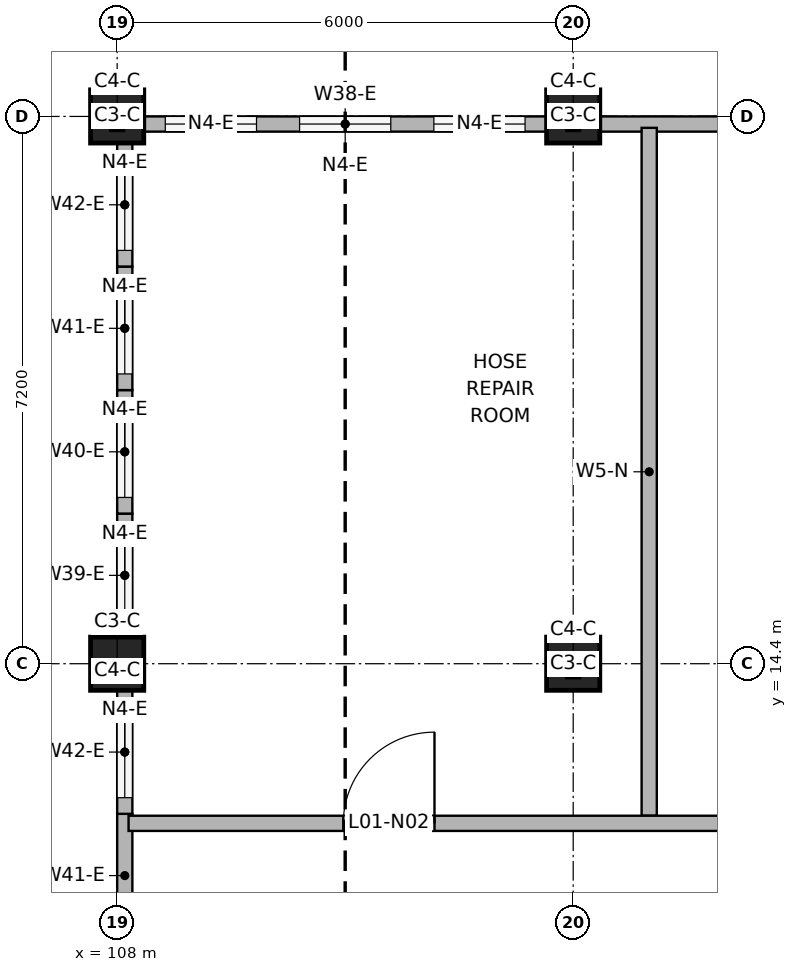
"""IFC4 building model, lengths in metres.
Left out: names, types, materials, properties, quantities, classifications, styles, units other than length and angle.
Written with IfcOpenShell. Run it as: python <this file> out.ifc"""

import sys

from ifc_helpers import new_model, si_unit, direction, frame, frame_2d, origin, origin_2d, place, context, subcontext, project, spatial, rectangle, hollow_rectangle, extrude, element, fill, save


model = new_model("IFC4")
c1 = context("Model", 3, precision=1e-05, world=origin(), true_north=direction((0.0, 1.0)))
c2 = subcontext(c1, "Body", "Model", "MODEL_VIEW")
j1 = project(units=[si_unit("LENGTHUNIT", "METRE"), si_unit("PLANEANGLEUNIT", "RADIAN")], contexts=[c1])
p1 = place(None, origin())
s1 = spatial("IfcSite", under=j1, at=p1, CompositionType="ELEMENT")
p2 = place(p1, origin())
s2 = spatial("IfcBuilding", under=s1, at=p2, CompositionType="ELEMENT")
p3 = place(p2, frame((0.0, 0.0, 4.2)))
s3 = spatial("IfcBuildingStorey", under=s2, at=p3, CompositionType="ELEMENT", Elevation=4.2)
for number, where, z_axis, x_axis in (
    (1, (108.0, 14.4, 0.0), (0.0, 0.0, 1.0), (1.0, 0.0, 0.0)),
    (2, (114.0, 14.4, 0.0), (0.0, 0.0, 1.0), (1.0, 0.0, 0.0)),
    (3, (108.0, 21.6, 0.0), (0.0, 0.0, 1.0), (1.0, 0.0, 0.0)),
    (4, (114.0, 21.6, 0.0), (0.0, 0.0, 1.0), (1.0, 0.0, 0.0)),
):
    element("IfcColumn", number, at=place(p3, frame(where, z_axis=z_axis, x_axis=x_axis)), inside=s3, PredefinedType="COLUMN", context=c2, shape_type="SweptSolid", body=[
        extrude(rectangle(XDim=0.7, YDim=0.7, at=origin_2d()), origin(), (0.0, 0.0, 1.0), 4.004),
    ])
for number, where, z_axis, x_axis in (
    (5, (108.0, 14.3, 4.004), (0.0, 0.0, 1.0), (1.0, 0.0, 0.0)),
    (6, (114.0, 14.3, 4.004), (0.0, 0.0, 1.0), (1.0, 0.0, 0.0)),
    (7, (108.0, 21.5, 4.004), (0.0, 0.0, 1.0), (1.0, 0.0, 0.0)),
    (8, (114.0, 21.5, 4.004), (0.0, 0.0, 1.0), (1.0, 0.0, 0.0)),
):
    element("IfcColumn", number, at=place(p3, frame(where, z_axis=z_axis, x_axis=x_axis)), inside=s3, PredefinedType="COLUMN", context=c2, shape_type="SweptSolid", body=[
        extrude(hollow_rectangle(XDim=0.15, YDim=0.15, WallThickness=0.008, at=origin_2d()), origin(), (0.0, 0.0, 1.0), 1.155),
    ])
p4 = place(p3, frame((108.35, 21.5, 0.0), z_axis=(0.0, 0.0, 1.0), x_axis=(1.0, 0.0, 0.0)))
e9 = element("IfcWall", 9, at=p4, inside=s3, PredefinedType="SOLIDWALL", context=c2, shape_type="SweptSolid", body=[
    extrude(rectangle(XDim=5.3, YDim=0.2, at=frame_2d((2.65, 0.0))), origin(), (0.0, 0.0, 1.0), 3.204),
])
p5 = place(p4, frame((0.283, 0.0, 1.2)))
e10 = element("IfcOpeningElement", 10, at=p5, cuts=e9, PredefinedType="OPENING", context=c2, shape_type="SweptSolid", body=[
    extrude(rectangle(XDim=1.2, YDim=1.4, at=frame_2d((0.6, 0.7))), frame((0.0, 0.11, 0.0), z_axis=(0.0, -1.0, 0.0), x_axis=(1.0, 0.0, 0.0)), (0.0, 0.0, 1.0), 0.22),
])
p6 = place(p4, frame((2.05, 0.0, 1.2)))
e11 = element("IfcOpeningElement", 11, at=p6, cuts=e9, PredefinedType="OPENING", context=c2, shape_type="SweptSolid", body=[
    extrude(rectangle(XDim=1.2, YDim=1.4, at=frame_2d((0.6, 0.7))), frame((0.0, 0.11, 0.0), z_axis=(0.0, -1.0, 0.0), x_axis=(1.0, 0.0, 0.0)), (0.0, 0.0, 1.0), 0.22),
])
p7 = place(p4, frame((3.817, 0.0, 1.2)))
e12 = element("IfcOpeningElement", 12, at=p7, cuts=e9, PredefinedType="OPENING", context=c2, shape_type="SweptSolid", body=[
    extrude(rectangle(XDim=1.2, YDim=1.4, at=frame_2d((0.6, 0.7))), frame((0.0, 0.11, 0.0), z_axis=(0.0, -1.0, 0.0), x_axis=(1.0, 0.0, 0.0)), (0.0, 0.0, 1.0), 0.22),
])
p8 = place(p3, frame((114.35, 21.5, 0.0), z_axis=(0.0, 0.0, 1.0), x_axis=(1.0, 0.0, 0.0)))
e13 = element("IfcWall", 13, at=p8, inside=s3, PredefinedType="SOLIDWALL", context=c2, shape_type="SweptSolid", body=[
    extrude(rectangle(XDim=5.3, YDim=0.2, at=frame_2d((2.65, 0.0))), origin(), (0.0, 0.0, 1.0), 3.204),
])
p9 = place(p3, frame((108.1, 10.8, 0.0), z_axis=(0.0, 0.0, 1.0), x_axis=(0.0, 1.0, 0.0)))
e14 = element("IfcWall", 14, at=p9, inside=s3, PredefinedType="SOLIDWALL", context=c2, shape_type="SweptSolid", body=[
    extrude(rectangle(XDim=1.625, YDim=0.2, at=frame_2d((0.812, 0.0))), origin(), (0.0, 0.0, 1.0), 4.691),
])
p10 = place(p3, frame((108.1, 12.425, 0.0), z_axis=(0.0, 0.0, 1.0), x_axis=(0.0, 1.0, 0.0)))
e15 = element("IfcWall", 15, at=p10, inside=s3, PredefinedType="SOLIDWALL", context=c2, shape_type="SweptSolid", body=[
    extrude(rectangle(XDim=1.625, YDim=0.2, at=frame_2d((0.812, 0.0))), origin(), (0.0, 0.0, 1.0), 5.007),
])
p11 = place(p10, frame((0.212, 0.0, 1.2)))
e16 = element("IfcOpeningElement", 16, at=p11, cuts=e15, PredefinedType="OPENING", context=c2, shape_type="SweptSolid", body=[
    extrude(rectangle(XDim=1.2, YDim=1.4, at=frame_2d((0.6, 0.7))), frame((0.0, 0.11, 0.0), z_axis=(0.0, -1.0, 0.0), x_axis=(1.0, 0.0, 0.0)), (0.0, 0.0, 1.0), 0.22),
])
p12 = place(p3, frame((108.1, 14.75, 0.0), z_axis=(0.0, 0.0, 1.0), x_axis=(0.0, 1.0, 0.0)))
e17 = element("IfcWall", 17, at=p12, inside=s3, PredefinedType="SOLIDWALL", context=c2, shape_type="SweptSolid", body=[
    extrude(rectangle(XDim=1.625, YDim=0.2, at=frame_2d((0.812, 0.0))), origin(), (0.0, 0.0, 1.0), 4.059),
])
p13 = place(p12, frame((0.212, 0.0, 1.2)))
e18 = element("IfcOpeningElement", 18, at=p13, cuts=e17, PredefinedType="OPENING", context=c2, shape_type="SweptSolid", body=[
    extrude(rectangle(XDim=1.2, YDim=1.4, at=frame_2d((0.6, 0.7))), frame((0.0, 0.11, 0.0), z_axis=(0.0, -1.0, 0.0), x_axis=(1.0, 0.0, 0.0)), (0.0, 0.0, 1.0), 0.22),
])
p14 = place(p3, frame((108.1, 16.375, 0.0), z_axis=(0.0, 0.0, 1.0), x_axis=(0.0, 1.0, 0.0)))
e19 = element("IfcWall", 19, at=p14, inside=s3, PredefinedType="SOLIDWALL", context=c2, shape_type="SweptSolid", body=[
    extrude(rectangle(XDim=1.625, YDim=0.2, at=frame_2d((0.812, 0.0))), origin(), (0.0, 0.0, 1.0), 4.375),
])
p15 = place(p14, frame((0.212, 0.0, 1.2)))
e20 = element("IfcOpeningElement", 20, at=p15, cuts=e19, PredefinedType="OPENING", context=c2, shape_type="SweptSolid", body=[
    extrude(rectangle(XDim=1.2, YDim=1.4, at=frame_2d((0.6, 0.7))), frame((0.0, 0.11, 0.0), z_axis=(0.0, -1.0, 0.0), x_axis=(1.0, 0.0, 0.0)), (0.0, 0.0, 1.0), 0.22),
])
p16 = place(p3, frame((108.1, 18.0, 0.0), z_axis=(0.0, 0.0, 1.0), x_axis=(0.0, 1.0, 0.0)))
e21 = element("IfcWall", 21, at=p16, inside=s3, PredefinedType="SOLIDWALL", context=c2, shape_type="SweptSolid", body=[
    extrude(rectangle(XDim=1.625, YDim=0.2, at=frame_2d((0.812, 0.0))), origin(), (0.0, 0.0, 1.0), 4.691),
])
p17 = place(p16, frame((0.212, 0.0, 1.2)))
e22 = element("IfcOpeningElement", 22, at=p17, cuts=e21, PredefinedType="OPENING", context=c2, shape_type="SweptSolid", body=[
    extrude(rectangle(XDim=1.2, YDim=1.4, at=frame_2d((0.6, 0.7))), frame((0.0, 0.11, 0.0), z_axis=(0.0, -1.0, 0.0), x_axis=(1.0, 0.0, 0.0)), (0.0, 0.0, 1.0), 0.22),
])
p18 = place(p3, frame((108.1, 19.625, 0.0), z_axis=(0.0, 0.0, 1.0), x_axis=(0.0, 1.0, 0.0)))
e23 = element("IfcWall", 23, at=p18, inside=s3, PredefinedType="SOLIDWALL", context=c2, shape_type="SweptSolid", body=[
    extrude(rectangle(XDim=1.625, YDim=0.2, at=frame_2d((0.812, 0.0))), origin(), (0.0, 0.0, 1.0), 5.007),
])
p19 = place(p18, frame((0.212, 0.0, 1.2)))
e24 = element("IfcOpeningElement", 24, at=p19, cuts=e23, PredefinedType="OPENING", context=c2, shape_type="SweptSolid", body=[
    extrude(rectangle(XDim=1.2, YDim=1.4, at=frame_2d((0.6, 0.7))), frame((0.0, 0.11, 0.0), z_axis=(0.0, -1.0, 0.0), x_axis=(1.0, 0.0, 0.0)), (0.0, 0.0, 1.0), 0.22),
])
p20 = place(p3, frame((115.0, 12.4, 0.0), z_axis=(0.0, 0.0, 1.0), x_axis=(0.0, 1.0, 0.0)))
e25 = element("IfcWall", 25, at=p20, inside=s3, PredefinedType="PARTITIONING", context=c2, shape_type="SweptSolid", body=[
    extrude(rectangle(XDim=9.05, YDim=0.2, at=frame_2d((4.525, 0.0))), origin(), (0.0, 0.0, 1.0), 3.204),
])
p21 = place(p3, frame((108.15, 12.3, 0.0), z_axis=(0.0, 0.0, 1.0), x_axis=(1.0, 0.0, 0.0)))
e26 = element("IfcWall", 26, at=p21, inside=s3, PredefinedType="PARTITIONING", context=c2, shape_type="SweptSolid", body=[
    extrude(rectangle(XDim=17.7, YDim=0.2, at=frame_2d((8.85, 0.0))), origin(), (0.0, 0.0, 1.0), 3.95),
])
p22 = place(p21, frame((2.825, 0.0, 0.0)))
e27 = element("IfcOpeningElement", 27, at=p22, cuts=e26, PredefinedType="OPENING", context=c2, shape_type="SweptSolid", body=[
    extrude(rectangle(XDim=1.2, YDim=2.1, at=frame_2d((0.6, 1.05))), frame((0.0, 0.11, 0.0), z_axis=(0.0, -1.0, 0.0), x_axis=(1.0, 0.0, 0.0)), (0.0, 0.0, 1.0), 0.22),
])
p23 = place(p21, frame((9.75, 0.0, 0.0)))
e28 = element("IfcOpeningElement", 28, at=p23, cuts=e26, PredefinedType="OPENING", context=c2, shape_type="SweptSolid", body=[
    extrude(rectangle(XDim=1.2, YDim=2.1, at=frame_2d((0.6, 1.05))), frame((0.0, 0.11, 0.0), z_axis=(0.0, -1.0, 0.0), x_axis=(1.0, 0.0, 0.0)), (0.0, 0.0, 1.0), 0.22),
])
p24 = place(p21, frame((15.275, 0.0, 0.0)))
e29 = element("IfcOpeningElement", 29, at=p24, cuts=e26, PredefinedType="OPENING", context=c2, shape_type="SweptSolid", body=[
    extrude(rectangle(XDim=1.0, YDim=2.1, at=frame_2d((0.5, 1.05))), frame((0.0, 0.11, 0.0), z_axis=(0.0, -1.0, 0.0), x_axis=(1.0, 0.0, 0.0)), (0.0, 0.0, 1.0), 0.22),
])
p25 = place(p5, origin())
e30 = element("IfcWindow", 30, at=p25, inside=s3, PartitioningType="SINGLE_PANEL", PredefinedType="WINDOW", context=c2, shape_type="SweptSolid", body=[
    extrude(rectangle(XDim=1.2, YDim=1.4, at=frame_2d((0.6, 0.7))), frame((0.0, 0.03, 0.0), z_axis=(0.0, -1.0, 0.0), x_axis=(1.0, 0.0, 0.0)), (0.0, 0.0, 1.0), 0.06),
])
fill(e10, e30)
p26 = place(p6, origin())
e31 = element("IfcWindow", 31, at=p26, inside=s3, PartitioningType="SINGLE_PANEL", PredefinedType="WINDOW", context=c2, shape_type="SweptSolid", body=[
    extrude(rectangle(XDim=1.2, YDim=1.4, at=frame_2d((0.6, 0.7))), frame((0.0, 0.03, 0.0), z_axis=(0.0, -1.0, 0.0), x_axis=(1.0, 0.0, 0.0)), (0.0, 0.0, 1.0), 0.06),
])
fill(e11, e31)
p27 = place(p7, origin())
e32 = element("IfcWindow", 32, at=p27, inside=s3, PartitioningType="SINGLE_PANEL", PredefinedType="WINDOW", context=c2, shape_type="SweptSolid", body=[
    extrude(rectangle(XDim=1.2, YDim=1.4, at=frame_2d((0.6, 0.7))), frame((0.0, 0.03, 0.0), z_axis=(0.0, -1.0, 0.0), x_axis=(1.0, 0.0, 0.0)), (0.0, 0.0, 1.0), 0.06),
])
fill(e12, e32)
p28 = place(p11, origin())
e33 = element("IfcWindow", 33, at=p28, inside=s3, PartitioningType="SINGLE_PANEL", PredefinedType="WINDOW", context=c2, shape_type="SweptSolid", body=[
    extrude(rectangle(XDim=1.2, YDim=1.4, at=frame_2d((0.6, 0.7))), frame((0.0, 0.03, 0.0), z_axis=(0.0, -1.0, 0.0), x_axis=(1.0, 0.0, 0.0)), (0.0, 0.0, 1.0), 0.06),
])
fill(e16, e33)
p29 = place(p13, origin())
e34 = element("IfcWindow", 34, at=p29, inside=s3, PartitioningType="SINGLE_PANEL", PredefinedType="WINDOW", context=c2, shape_type="SweptSolid", body=[
    extrude(rectangle(XDim=1.2, YDim=1.4, at=frame_2d((0.6, 0.7))), frame((0.0, 0.03, 0.0), z_axis=(0.0, -1.0, 0.0), x_axis=(1.0, 0.0, 0.0)), (0.0, 0.0, 1.0), 0.06),
])
fill(e18, e34)
p30 = place(p15, origin())
e35 = element("IfcWindow", 35, at=p30, inside=s3, PartitioningType="SINGLE_PANEL", PredefinedType="WINDOW", context=c2, shape_type="SweptSolid", body=[
    extrude(rectangle(XDim=1.2, YDim=1.4, at=frame_2d((0.6, 0.7))), frame((0.0, 0.03, 0.0), z_axis=(0.0, -1.0, 0.0), x_axis=(1.0, 0.0, 0.0)), (0.0, 0.0, 1.0), 0.06),
])
fill(e20, e35)
p31 = place(p17, origin())
e36 = element("IfcWindow", 36, at=p31, inside=s3, PartitioningType="SINGLE_PANEL", PredefinedType="WINDOW", context=c2, shape_type="SweptSolid", body=[
    extrude(rectangle(XDim=1.2, YDim=1.4, at=frame_2d((0.6, 0.7))), frame((0.0, 0.03, 0.0), z_axis=(0.0, -1.0, 0.0), x_axis=(1.0, 0.0, 0.0)), (0.0, 0.0, 1.0), 0.06),
])
fill(e22, e36)
p32 = place(p19, origin())
e37 = element("IfcWindow", 37, at=p32, inside=s3, PartitioningType="SINGLE_PANEL", PredefinedType="WINDOW", context=c2, shape_type="SweptSolid", body=[
    extrude(rectangle(XDim=1.2, YDim=1.4, at=frame_2d((0.6, 0.7))), frame((0.0, 0.03, 0.0), z_axis=(0.0, -1.0, 0.0), x_axis=(1.0, 0.0, 0.0)), (0.0, 0.0, 1.0), 0.06),
])
fill(e24, e37)
p33 = place(p22, origin())
e38 = element("IfcDoor", 38, at=p33, inside=s3, OperationType="SINGLE_SWING_RIGHT", PredefinedType="DOOR", context=c2, shape_type="SweptSolid", body=[
    extrude(rectangle(XDim=1.2, YDim=2.1, at=frame_2d((0.6, 1.05))), frame((0.0, 0.025, 0.0), z_axis=(0.0, -1.0, 0.0), x_axis=(1.0, 0.0, 0.0)), (0.0, 0.0, 1.0), 0.05),
])
fill(e27, e38)
save(model, sys.argv[1])
